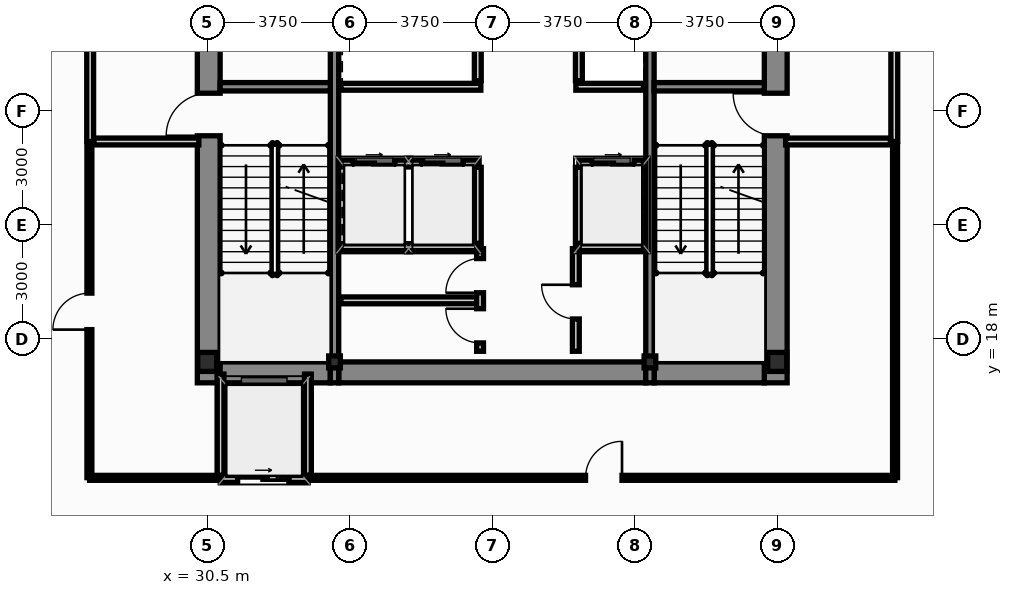
"""IFC4 building model, lengths in metres.
Left out: names, types, materials, properties, quantities, classifications, styles, units other than length and angle.
Written with IfcOpenShell. Run it as: python <this file> out.ifc"""

import sys

from ifc_helpers import new_model, si_unit, direction, frame, frame_2d, origin, origin_2d, place, context, subcontext, project, spatial, rectangle, i_section, extrude, source, transform, mapped, element, fill, save


model = new_model("IFC4")
c1 = context("Model", 3, precision=1e-05, world=origin(), true_north=direction((0.0, 1.0)))
c2 = subcontext(c1, "Body", "Model", "MODEL_VIEW")
j1 = project(units=[si_unit("LENGTHUNIT", "METRE"), si_unit("PLANEANGLEUNIT", "RADIAN")], contexts=[c1])
p1 = place(None, origin())
s1 = spatial("IfcSite", under=j1, at=p1, CompositionType="ELEMENT")
p2 = place(p1, origin())
s2 = spatial("IfcBuilding", under=s1, at=p2, CompositionType="ELEMENT")
p3 = place(p2, frame((0.0, 0.0, 5.4)))
s3 = spatial("IfcBuildingStorey", under=s2, at=p3, CompositionType="ELEMENT", Elevation=5.4)
m1 = source(origin(), c2, "Body", "SweptSolid", [
    extrude(i_section(OverallWidth=0.5, OverallDepth=0.5, WebThickness=0.028, FlangeThickness=0.04, at=origin_2d()), origin(), (0.0, 0.0, 1.0), 4.8),
])
for number, where, z_axis, x_axis in (
    (1, (30.5, 17.4, 0.0), (0.0, 0.0, 1.0), (1.0, 0.0, 0.0)),
    (2, (45.5, 17.4, 0.0), (0.0, 0.0, 1.0), (1.0, 0.0, 0.0)),
):
    element("IfcColumn", number, at=place(p3, frame(where, z_axis=z_axis, x_axis=x_axis)), inside=s3, PredefinedType="COLUMN", context=c2, shape_type="MappedRepresentation", body=[
        mapped(m1, transform((0.0, 0.0, 0.0), scale=1.0)),
    ])
m2 = source(origin(), c2, "Body", "SweptSolid", [
    extrude(i_section(OverallWidth=0.307, OverallDepth=0.315, WebThickness=0.012, FlangeThickness=0.019, at=origin_2d()), origin(), (0.0, 0.0, 1.0), 4.8),
])
for number, where, z_axis, x_axis in (
    (3, (33.85, 17.4, 0.0), (0.0, 0.0, 1.0), (1.0, 0.0, 0.0)),
    (4, (42.15, 17.4, 0.0), (0.0, 0.0, 1.0), (1.0, 0.0, 0.0)),
):
    element("IfcColumn", number, at=place(p3, frame(where, z_axis=z_axis, x_axis=x_axis)), inside=s3, PredefinedType="COLUMN", context=c2, shape_type="MappedRepresentation", body=[
        mapped(m2, transform((0.0, 0.0, 0.0), scale=1.0)),
    ])
p4 = place(p3, frame((30.54, 16.85, 0.0), z_axis=(0.0, 0.0, 1.0), x_axis=(0.0, 1.0, 0.0)))
e5 = element("IfcWall", 5, at=p4, inside=s3, PredefinedType="SHEAR", context=c2, shape_type="SweptSolid", body=[
    extrude(rectangle(XDim=13.425, YDim=0.6, at=frame_2d((6.712, 0.0))), origin(), (0.0, 0.0, 1.0), 4.8),
])
p5 = place(p4, frame((6.5, 0.0, 0.0)))
e6 = element("IfcOpeningElement", 6, at=p5, cuts=e5, PredefinedType="OPENING", context=c2, shape_type="SweptSolid", body=[
    extrude(rectangle(XDim=1.12, YDim=2.15, at=frame_2d((0.56, 1.075))), frame((0.0, 0.312, 0.0), z_axis=(0.0, -1.0, 0.0), x_axis=(1.0, 0.0, 0.0)), (0.0, 0.0, 1.0), 0.624),
])
p6 = place(p4, frame((10.95, 0.0, 0.0)))
e7 = element("IfcOpeningElement", 7, at=p6, cuts=e5, PredefinedType="OPENING", context=c2, shape_type="SweptSolid", body=[
    extrude(rectangle(XDim=1.2, YDim=2.2, at=frame_2d((0.6, 1.1))), frame((0.0, 0.312, 0.0), z_axis=(0.0, -1.0, 0.0), x_axis=(1.0, 0.0, 0.0)), (0.0, 0.0, 1.0), 0.624),
])
p7 = place(p3, frame((45.46, 16.85, 0.0), z_axis=(0.0, 0.0, 1.0), x_axis=(0.0, 1.0, 0.0)))
e8 = element("IfcWall", 8, at=p7, inside=s3, PredefinedType="SHEAR", context=c2, shape_type="SweptSolid", body=[
    extrude(rectangle(XDim=13.425, YDim=0.6, at=frame_2d((6.712, 0.0))), origin(), (0.0, 0.0, 1.0), 4.8),
])
p8 = place(p7, frame((6.5, 0.0, 0.0)))
e9 = element("IfcOpeningElement", 9, at=p8, cuts=e8, PredefinedType="OPENING", context=c2, shape_type="SweptSolid", body=[
    extrude(rectangle(XDim=1.12, YDim=2.15, at=frame_2d((0.56, 1.075))), frame((0.0, 0.312, 0.0), z_axis=(0.0, -1.0, 0.0), x_axis=(1.0, 0.0, 0.0)), (0.0, 0.0, 1.0), 0.624),
])
p9 = place(p7, frame((10.95, 0.0, 0.0)))
e10 = element("IfcOpeningElement", 10, at=p9, cuts=e8, PredefinedType="OPENING", context=c2, shape_type="SweptSolid", body=[
    extrude(rectangle(XDim=1.2, YDim=2.2, at=frame_2d((0.6, 1.1))), frame((0.0, 0.312, 0.0), z_axis=(0.0, -1.0, 0.0), x_axis=(1.0, 0.0, 0.0)), (0.0, 0.0, 1.0), 0.624),
])
p10 = place(p3, frame((30.84, 17.125, 0.0), z_axis=(0.0, 0.0, 1.0), x_axis=(1.0, 0.0, 0.0)))
e11 = element("IfcWall", 11, at=p10, inside=s3, PredefinedType="SHEAR", context=c2, shape_type="SweptSolid", body=[
    extrude(rectangle(XDim=2.9, YDim=0.55, at=frame_2d((1.45, 0.0))), origin(), (0.0, 0.0, 1.0), 4.8),
])
p11 = place(p3, frame((33.96, 17.125, 0.0), z_axis=(0.0, 0.0, 1.0), x_axis=(1.0, 0.0, 0.0)))
e12 = element("IfcWall", 12, at=p11, inside=s3, PredefinedType="SHEAR", context=c2, shape_type="SweptSolid", body=[
    extrude(rectangle(XDim=8.08, YDim=0.55, at=frame_2d((4.04, 0.0))), origin(), (0.0, 0.0, 1.0), 4.8),
])
p12 = place(p3, frame((42.26, 17.125, 0.0), z_axis=(0.0, 0.0, 1.0), x_axis=(1.0, 0.0, 0.0)))
e13 = element("IfcWall", 13, at=p12, inside=s3, PredefinedType="SHEAR", context=c2, shape_type="SweptSolid", body=[
    extrude(rectangle(XDim=2.9, YDim=0.55, at=frame_2d((1.45, 0.0))), origin(), (0.0, 0.0, 1.0), 4.8),
])
for number, where, z_axis, x_axis in (
    (14, (33.85, 16.85, 0.0), (0.0, 0.0, 1.0), (0.0, 1.0, 0.0)),
    (15, (42.15, 16.85, 0.0), (0.0, 0.0, 1.0), (0.0, 1.0, 0.0)),
):
    element("IfcWall", number, at=place(p3, frame(where, z_axis=z_axis, x_axis=x_axis)), inside=s3, PredefinedType="SHEAR", context=c2, shape_type="SweptSolid", body=[
        extrude(rectangle(XDim=13.425, YDim=0.22, at=frame_2d((6.712, 0.0))), origin(), (0.0, 0.0, 1.0), 4.8),
    ])
for number, where, z_axis, x_axis in (
    (16, (30.84, 24.64, 0.0), (0.0, 0.0, 1.0), (1.0, 0.0, 0.0)),
    (17, (42.26, 24.64, 0.0), (0.0, 0.0, 1.0), (1.0, 0.0, 0.0)),
):
    element("IfcWall", number, at=place(p3, frame(where, z_axis=z_axis, x_axis=x_axis)), inside=s3, PredefinedType="SHEAR", context=c2, shape_type="SweptSolid", body=[
        extrude(rectangle(XDim=2.9, YDim=0.22, at=frame_2d((1.45, 0.0))), origin(), (0.0, 0.0, 1.0), 4.8),
    ])
p13 = place(p3, frame((30.85, 14.32, 0.0), z_axis=(0.0, 0.0, 1.0), x_axis=(1.0, 0.0, 0.0)))
e18 = element("IfcWall", 18, at=p13, inside=s3, PredefinedType="PARTITIONING", context=c2, shape_type="SweptSolid", body=[
    extrude(rectangle(XDim=2.3, YDim=0.18, at=frame_2d((1.15, 0.0))), origin(), (0.0, 0.0, 1.0), 4.48),
])
p14 = place(p13, frame((0.45, 0.0, 0.0)))
e19 = element("IfcOpeningElement", 19, at=p14, cuts=e18, PredefinedType="OPENING", context=c2, shape_type="SweptSolid", body=[
    extrude(rectangle(XDim=1.35, YDim=2.25, at=frame_2d((0.675, 1.125))), frame((0.0, 0.102, 0.0), z_axis=(0.0, -1.0, 0.0), x_axis=(1.0, 0.0, 0.0)), (0.0, 0.0, 1.0), 0.204),
])
p15 = place(p3, frame((30.85, 14.42, 0.0), z_axis=(0.0, 0.0, 1.0), x_axis=(0.0, 1.0, 0.0)))
e20 = element("IfcWall", 20, at=p15, inside=s3, PredefinedType="PARTITIONING", context=c2, shape_type="SweptSolid", body=[
    extrude(rectangle(XDim=2.66, YDim=0.18, at=frame_2d((1.33, 0.0))), origin(), (0.0, 0.0, 1.0), 3.854),
])
p16 = place(p3, frame((33.15, 14.42, 0.0), z_axis=(0.0, 0.0, 1.0), x_axis=(0.0, 1.0, 0.0)))
e21 = element("IfcWall", 21, at=p16, inside=s3, PredefinedType="PARTITIONING", context=c2, shape_type="SweptSolid", body=[
    extrude(rectangle(XDim=2.66, YDim=0.18, at=frame_2d((1.33, 0.0))), origin(), (0.0, 0.0, 1.0), 4.48),
])
p17 = place(p3, frame((34.02, 22.62, 0.0), z_axis=(0.0, 0.0, 1.0), x_axis=(1.0, 0.0, 0.0)))
e22 = element("IfcWall", 22, at=p17, inside=s3, PredefinedType="PARTITIONING", context=c2, shape_type="SweptSolid", body=[
    extrude(rectangle(XDim=3.6, YDim=0.18, at=frame_2d((1.8, 0.0))), origin(), (0.0, 0.0, 1.0), 4.48),
])
p18 = place(p17, frame((0.32, 0.0, 0.0)))
e23 = element("IfcOpeningElement", 23, at=p18, cuts=e22, PredefinedType="OPENING", context=c2, shape_type="SweptSolid", body=[
    extrude(rectangle(XDim=1.1, YDim=2.2, at=frame_2d((0.55, 1.1))), frame((0.0, 0.102, 0.0), z_axis=(0.0, -1.0, 0.0), x_axis=(1.0, 0.0, 0.0)), (0.0, 0.0, 1.0), 0.204),
])
p19 = place(p17, frame((2.12, 0.0, 0.0)))
e24 = element("IfcOpeningElement", 24, at=p19, cuts=e22, PredefinedType="OPENING", context=c2, shape_type="SweptSolid", body=[
    extrude(rectangle(XDim=1.1, YDim=2.2, at=frame_2d((0.55, 1.1))), frame((0.0, 0.102, 0.0), z_axis=(0.0, -1.0, 0.0), x_axis=(1.0, 0.0, 0.0)), (0.0, 0.0, 1.0), 0.204),
])
p20 = place(p3, frame((40.28, 22.62, 0.0), z_axis=(0.0, 0.0, 1.0), x_axis=(1.0, 0.0, 0.0)))
e25 = element("IfcWall", 25, at=p20, inside=s3, PredefinedType="PARTITIONING", context=c2, shape_type="SweptSolid", body=[
    extrude(rectangle(XDim=1.7, YDim=0.18, at=frame_2d((0.85, 0.0))), origin(), (0.0, 0.0, 1.0), 4.48),
])
p21 = place(p20, frame((0.35, 0.0, 0.0)))
e26 = element("IfcOpeningElement", 26, at=p21, cuts=e25, PredefinedType="OPENING", context=c2, shape_type="SweptSolid", body=[
    extrude(rectangle(XDim=1.1, YDim=2.2, at=frame_2d((0.55, 1.1))), frame((0.0, 0.102, 0.0), z_axis=(0.0, -1.0, 0.0), x_axis=(1.0, 0.0, 0.0)), (0.0, 0.0, 1.0), 0.204),
])
for number, where, z_axis, x_axis in (
    (27, (37.62, 20.52, 0.0), (0.0, 0.0, 1.0), (0.0, 1.0, 0.0)),
    (28, (40.28, 20.52, 0.0), (0.0, 0.0, 1.0), (0.0, 1.0, 0.0)),
    (29, (37.62, 24.8, 0.0), (0.0, 0.0, 1.0), (0.0, 1.0, 0.0)),
    (30, (40.28, 24.8, 0.0), (0.0, 0.0, 1.0), (0.0, 1.0, 0.0)),
):
    element("IfcWall", number, at=place(p3, frame(where, z_axis=z_axis, x_axis=x_axis)), inside=s3, PredefinedType="PARTITIONING", context=c2, shape_type="SweptSolid", body=[
        extrude(rectangle(XDim=2.0, YDim=0.18, at=frame_2d((1.0, 0.0))), origin(), (0.0, 0.0, 1.0), 4.48),
    ])
p22 = place(p3, frame((34.02, 24.64, 0.0), z_axis=(0.0, 0.0, 1.0), x_axis=(1.0, 0.0, 0.0)))
e31 = element("IfcWall", 31, at=p22, inside=s3, PredefinedType="PARTITIONING", context=c2, shape_type="SweptSolid", body=[
    extrude(rectangle(XDim=3.68, YDim=0.18, at=frame_2d((1.84, 0.0))), origin(), (0.0, 0.0, 1.0), 4.48),
])
p23 = place(p3, frame((40.2, 24.64, 0.0), z_axis=(0.0, 0.0, 1.0), x_axis=(1.0, 0.0, 0.0)))
e32 = element("IfcWall", 32, at=p23, inside=s3, PredefinedType="PARTITIONING", context=c2, shape_type="SweptSolid", body=[
    extrude(rectangle(XDim=1.78, YDim=0.18, at=frame_2d((0.89, 0.0))), origin(), (0.0, 0.0, 1.0), 4.48),
])
p24 = place(p3, frame((27.42, 23.2, 0.0), z_axis=(0.0, 0.0, 1.0), x_axis=(0.0, 1.0, 0.0)))
e33 = element("IfcWall", 33, at=p24, inside=s3, PredefinedType="PARTITIONING", context=c2, shape_type="SweptSolid", body=[
    extrude(rectangle(XDim=6.4, YDim=0.18, at=frame_2d((3.2, 0.0))), origin(), (0.0, 0.0, 1.0), 4.106),
])
p25 = place(p24, frame((2.65, 0.0, 0.0)))
e34 = element("IfcOpeningElement", 34, at=p25, cuts=e33, PredefinedType="OPENING", context=c2, shape_type="SweptSolid", body=[
    extrude(rectangle(XDim=1.05, YDim=2.15, at=frame_2d((0.525, 1.075))), frame((0.0, 0.102, 0.0), z_axis=(0.0, -1.0, 0.0), x_axis=(1.0, 0.0, 0.0)), (0.0, 0.0, 1.0), 0.204),
])
p26 = place(p3, frame((27.52, 23.2, 0.0), z_axis=(0.0, 0.0, 1.0), x_axis=(1.0, 0.0, 0.0)))
e35 = element("IfcWall", 35, at=p26, inside=s3, PredefinedType="PARTITIONING", context=c2, shape_type="SweptSolid", body=[
    extrude(rectangle(XDim=2.76, YDim=0.18, at=frame_2d((1.38, 0.0))), origin(), (0.0, 0.0, 1.0), 4.48),
])
p27 = place(p3, frame((48.58, 23.2, 0.0), z_axis=(0.0, 0.0, 1.0), x_axis=(0.0, 1.0, 0.0)))
e36 = element("IfcWall", 36, at=p27, inside=s3, PredefinedType="PARTITIONING", context=c2, shape_type="SweptSolid", body=[
    extrude(rectangle(XDim=6.4, YDim=0.18, at=frame_2d((3.2, 0.0))), origin(), (0.0, 0.0, 1.0), 4.48),
])
p28 = place(p27, frame((2.65, 0.0, 0.0)))
e37 = element("IfcOpeningElement", 37, at=p28, cuts=e36, PredefinedType="OPENING", context=c2, shape_type="SweptSolid", body=[
    extrude(rectangle(XDim=1.05, YDim=2.15, at=frame_2d((0.525, 1.075))), frame((0.0, 0.102, 0.0), z_axis=(0.0, -1.0, 0.0), x_axis=(1.0, 0.0, 0.0)), (0.0, 0.0, 1.0), 0.204),
])
p29 = place(p3, frame((45.72, 23.2, 0.0), z_axis=(0.0, 0.0, 1.0), x_axis=(1.0, 0.0, 0.0)))
e38 = element("IfcWall", 38, at=p29, inside=s3, PredefinedType="PARTITIONING", context=c2, shape_type="SweptSolid", body=[
    extrude(rectangle(XDim=2.76, YDim=0.18, at=frame_2d((1.38, 0.0))), origin(), (0.0, 0.0, 1.0), 4.48),
])
p30 = place(p3, frame((34.02, 20.42, 0.0), z_axis=(0.0, 0.0, 1.0), x_axis=(1.0, 0.0, 0.0)))
e39 = element("IfcWall", 39, at=p30, inside=s3, PredefinedType="PARTITIONING", context=c2, shape_type="SweptSolid", body=[
    extrude(rectangle(XDim=3.64, YDim=0.18, at=frame_2d((1.82, 0.0))), origin(), (0.0, 0.0, 1.0), 4.48),
])
p31 = place(p3, frame((40.22, 20.42, 0.0), z_axis=(0.0, 0.0, 1.0), x_axis=(1.0, 0.0, 0.0)))
e40 = element("IfcWall", 40, at=p31, inside=s3, PredefinedType="PARTITIONING", context=c2, shape_type="SweptSolid", body=[
    extrude(rectangle(XDim=1.76, YDim=0.18, at=frame_2d((0.88, 0.0))), origin(), (0.0, 0.0, 1.0), 4.48),
])
p32 = place(p3, frame((34.02, 19.02, 0.0), z_axis=(0.0, 0.0, 1.0), x_axis=(1.0, 0.0, 0.0)))
e41 = element("IfcWall", 41, at=p32, inside=s3, PredefinedType="PARTITIONING", context=c2, shape_type="SweptSolid", body=[
    extrude(rectangle(XDim=3.58, YDim=0.18, at=frame_2d((1.79, 0.0))), origin(), (0.0, 0.0, 1.0), 4.48),
])
p33 = place(p3, frame((37.68, 17.68, 0.0), z_axis=(0.0, 0.0, 1.0), x_axis=(0.0, 1.0, 0.0)))
e42 = element("IfcWall", 42, at=p33, inside=s3, PredefinedType="PARTITIONING", context=c2, shape_type="SweptSolid", body=[
    extrude(rectangle(XDim=2.7, YDim=0.18, at=frame_2d((1.35, 0.0))), origin(), (0.0, 0.0, 1.0), 4.48),
])
p34 = place(p33, frame((0.22, 0.0, 0.0)))
e43 = element("IfcOpeningElement", 43, at=p34, cuts=e42, PredefinedType="OPENING", context=c2, shape_type="SweptSolid", body=[
    extrude(rectangle(XDim=0.9, YDim=2.1, at=frame_2d((0.45, 1.05))), frame((0.0, 0.102, 0.0), z_axis=(0.0, -1.0, 0.0), x_axis=(1.0, 0.0, 0.0)), (0.0, 0.0, 1.0), 0.204),
])
p35 = place(p33, frame((1.54, 0.0, 0.0)))
e44 = element("IfcOpeningElement", 44, at=p35, cuts=e42, PredefinedType="OPENING", context=c2, shape_type="SweptSolid", body=[
    extrude(rectangle(XDim=0.9, YDim=2.1, at=frame_2d((0.45, 1.05))), frame((0.0, 0.102, 0.0), z_axis=(0.0, -1.0, 0.0), x_axis=(1.0, 0.0, 0.0)), (0.0, 0.0, 1.0), 0.204),
])
p36 = place(p3, frame((40.2, 17.68, 0.0), z_axis=(0.0, 0.0, 1.0), x_axis=(0.0, 1.0, 0.0)))
e45 = element("IfcWall", 45, at=p36, inside=s3, PredefinedType="PARTITIONING", context=c2, shape_type="SweptSolid", body=[
    extrude(rectangle(XDim=2.7, YDim=0.18, at=frame_2d((1.35, 0.0))), origin(), (0.0, 0.0, 1.0), 4.48),
])
p37 = place(p36, frame((0.85, 0.0, 0.0)))
e46 = element("IfcOpeningElement", 46, at=p37, cuts=e45, PredefinedType="OPENING", context=c2, shape_type="SweptSolid", body=[
    extrude(rectangle(XDim=0.9, YDim=2.1, at=frame_2d((0.45, 1.05))), frame((0.0, 0.102, 0.0), z_axis=(0.0, -1.0, 0.0), x_axis=(1.0, 0.0, 0.0)), (0.0, 0.0, 1.0), 0.204),
])
p38 = place(p3, frame((33.275, 14.35, 0.0), z_axis=(0.0, 0.0, 1.0), x_axis=(1.0, 0.0, 0.0)))
e47 = element("IfcWall", 47, at=p38, inside=s3, PredefinedType="PARTITIONING", context=c2, shape_type="SweptSolid", body=[
    extrude(rectangle(XDim=15.32, YDim=0.13, at=frame_2d((7.66, 0.0))), origin(), (0.0, 0.0, 1.0), 4.48),
])
p39 = place(p38, frame((7.18, 0.0, 0.0)))
e48 = element("IfcOpeningElement", 48, at=p39, cuts=e47, PredefinedType="OPENING", context=c2, shape_type="SweptSolid", body=[
    extrude(rectangle(XDim=0.96, YDim=2.15, at=frame_2d((0.48, 1.075))), frame((0.0, 0.077, 0.0), z_axis=(0.0, -1.0, 0.0), x_axis=(1.0, 0.0, 0.0)), (0.0, 0.0, 1.0), 0.154),
])
p40 = place(p3, frame((27.4, 14.355, 0.0), z_axis=(0.0, 0.0, 1.0), x_axis=(0.0, 1.0, 0.0)))
e49 = element("IfcWall", 49, at=p40, inside=s3, PredefinedType="PARTITIONING", context=c2, shape_type="SweptSolid", body=[
    extrude(rectangle(XDim=8.75, YDim=0.13, at=frame_2d((4.375, 0.0))), origin(), (0.0, 0.0, 1.0), 4.106),
])
p41 = place(p40, frame((3.895, 0.0, 0.0)))
e50 = element("IfcOpeningElement", 50, at=p41, cuts=e49, PredefinedType="OPENING", context=c2, shape_type="SweptSolid", body=[
    extrude(rectangle(XDim=0.96, YDim=2.15, at=frame_2d((0.48, 1.075))), frame((0.0, 0.077, 0.0), z_axis=(0.0, -1.0, 0.0), x_axis=(1.0, 0.0, 0.0)), (0.0, 0.0, 1.0), 0.154),
])
p42 = place(p3, frame((48.6, 14.355, 0.0), z_axis=(0.0, 0.0, 1.0), x_axis=(0.0, 1.0, 0.0)))
e51 = element("IfcWall", 51, at=p42, inside=s3, PredefinedType="PARTITIONING", context=c2, shape_type="SweptSolid", body=[
    extrude(rectangle(XDim=8.75, YDim=0.13, at=frame_2d((4.375, 0.0))), origin(), (0.0, 0.0, 1.0), 4.48),
])
p43 = place(p3, frame((30.725, 14.35, 0.0), z_axis=(0.0, 0.0, 1.0), x_axis=(-1.0, 0.0, 0.0)))
e52 = element("IfcWall", 52, at=p43, inside=s3, PredefinedType="PARTITIONING", context=c2, shape_type="SweptSolid", body=[
    extrude(rectangle(XDim=3.32, YDim=0.13, at=frame_2d((1.66, 0.0))), origin(), (0.0, 0.0, 1.0), 4.48),
])
p44 = place(p5, origin())
e53 = element("IfcDoor", 53, at=p44, inside=s3, OperationType="SINGLE_SWING_LEFT", PredefinedType="DOOR", context=c2, shape_type="SweptSolid", body=[
    extrude(rectangle(XDim=1.12, YDim=2.15, at=frame_2d((0.56, 1.075))), frame((0.0, 0.025, 0.0), z_axis=(0.0, -1.0, 0.0), x_axis=(1.0, 0.0, 0.0)), (0.0, 0.0, 1.0), 0.05),
])
fill(e6, e53)
p45 = place(p8, origin())
e54 = element("IfcDoor", 54, at=p45, inside=s3, OperationType="SINGLE_SWING_RIGHT", PredefinedType="DOOR", context=c2, shape_type="SweptSolid", body=[
    extrude(rectangle(XDim=1.12, YDim=2.15, at=frame_2d((0.56, 1.075))), frame((0.0, 0.025, 0.0), z_axis=(0.0, -1.0, 0.0), x_axis=(1.0, 0.0, 0.0)), (0.0, 0.0, 1.0), 0.05),
])
fill(e9, e54)
p46 = place(p14, origin())
e55 = element("IfcDoor", 55, at=p46, inside=s3, OperationType="SLIDING_TO_LEFT", PredefinedType="DOOR", context=c2, shape_type="SweptSolid", body=[
    extrude(rectangle(XDim=1.35, YDim=2.25, at=frame_2d((0.675, 1.125))), frame((0.0, 0.025, 0.0), z_axis=(0.0, -1.0, 0.0), x_axis=(1.0, 0.0, 0.0)), (0.0, 0.0, 1.0), 0.05),
])
fill(e19, e55)
p47 = place(p18, origin())
e56 = element("IfcDoor", 56, at=p47, inside=s3, OperationType="SLIDING_TO_LEFT", PredefinedType="DOOR", context=c2, shape_type="SweptSolid", body=[
    extrude(rectangle(XDim=1.1, YDim=2.2, at=frame_2d((0.55, 1.1))), frame((0.0, 0.025, 0.0), z_axis=(0.0, -1.0, 0.0), x_axis=(1.0, 0.0, 0.0)), (0.0, 0.0, 1.0), 0.05),
])
fill(e23, e56)
p48 = place(p19, origin())
e57 = element("IfcDoor", 57, at=p48, inside=s3, OperationType="SLIDING_TO_RIGHT", PredefinedType="DOOR", context=c2, shape_type="SweptSolid", body=[
    extrude(rectangle(XDim=1.1, YDim=2.2, at=frame_2d((0.55, 1.1))), frame((0.0, 0.025, 0.0), z_axis=(0.0, -1.0, 0.0), x_axis=(1.0, 0.0, 0.0)), (0.0, 0.0, 1.0), 0.05),
])
fill(e24, e57)
p49 = place(p21, origin())
e58 = element("IfcDoor", 58, at=p49, inside=s3, OperationType="SLIDING_TO_LEFT", PredefinedType="DOOR", context=c2, shape_type="SweptSolid", body=[
    extrude(rectangle(XDim=1.1, YDim=2.2, at=frame_2d((0.55, 1.1))), frame((0.0, 0.025, 0.0), z_axis=(0.0, -1.0, 0.0), x_axis=(1.0, 0.0, 0.0)), (0.0, 0.0, 1.0), 0.05),
])
fill(e26, e58)
p50 = place(p34, origin())
e59 = element("IfcDoor", 59, at=p50, inside=s3, OperationType="SINGLE_SWING_RIGHT", PredefinedType="DOOR", context=c2, shape_type="SweptSolid", body=[
    extrude(rectangle(XDim=0.9, YDim=2.1, at=frame_2d((0.45, 1.05))), frame((0.0, 0.025, 0.0), z_axis=(0.0, -1.0, 0.0), x_axis=(1.0, 0.0, 0.0)), (0.0, 0.0, 1.0), 0.05),
])
fill(e43, e59)
p51 = place(p35, origin())
e60 = element("IfcDoor", 60, at=p51, inside=s3, OperationType="SINGLE_SWING_LEFT", PredefinedType="DOOR", context=c2, shape_type="SweptSolid", body=[
    extrude(rectangle(XDim=0.9, YDim=2.1, at=frame_2d((0.45, 1.05))), frame((0.0, 0.025, 0.0), z_axis=(0.0, -1.0, 0.0), x_axis=(1.0, 0.0, 0.0)), (0.0, 0.0, 1.0), 0.05),
])
fill(e44, e60)
p52 = place(p37, origin())
e61 = element("IfcDoor", 61, at=p52, inside=s3, OperationType="SINGLE_SWING_RIGHT", PredefinedType="DOOR", context=c2, shape_type="SweptSolid", body=[
    extrude(rectangle(XDim=0.9, YDim=2.1, at=frame_2d((0.45, 1.05))), frame((0.0, 0.025, 0.0), z_axis=(0.0, -1.0, 0.0), x_axis=(1.0, 0.0, 0.0)), (0.0, 0.0, 1.0), 0.05),
])
fill(e46, e61)
p53 = place(p39, origin())
e62 = element("IfcDoor", 62, at=p53, inside=s3, OperationType="SINGLE_SWING_RIGHT", PredefinedType="DOOR", context=c2, shape_type="SweptSolid", body=[
    extrude(rectangle(XDim=0.96, YDim=2.15, at=frame_2d((0.48, 1.075))), frame((0.0, 0.025, 0.0), z_axis=(0.0, -1.0, 0.0), x_axis=(1.0, 0.0, 0.0)), (0.0, 0.0, 1.0), 0.05),
])
fill(e48, e62)
p54 = place(p41, origin())
e63 = element("IfcDoor", 63, at=p54, inside=s3, OperationType="SINGLE_SWING_LEFT", PredefinedType="DOOR", context=c2, shape_type="SweptSolid", body=[
    extrude(rectangle(XDim=0.96, YDim=2.15, at=frame_2d((0.48, 1.075))), frame((0.0, 0.025, 0.0), z_axis=(0.0, -1.0, 0.0), x_axis=(1.0, 0.0, 0.0)), (0.0, 0.0, 1.0), 0.05),
])
fill(e50, e63)
save(model, sys.argv[1])
